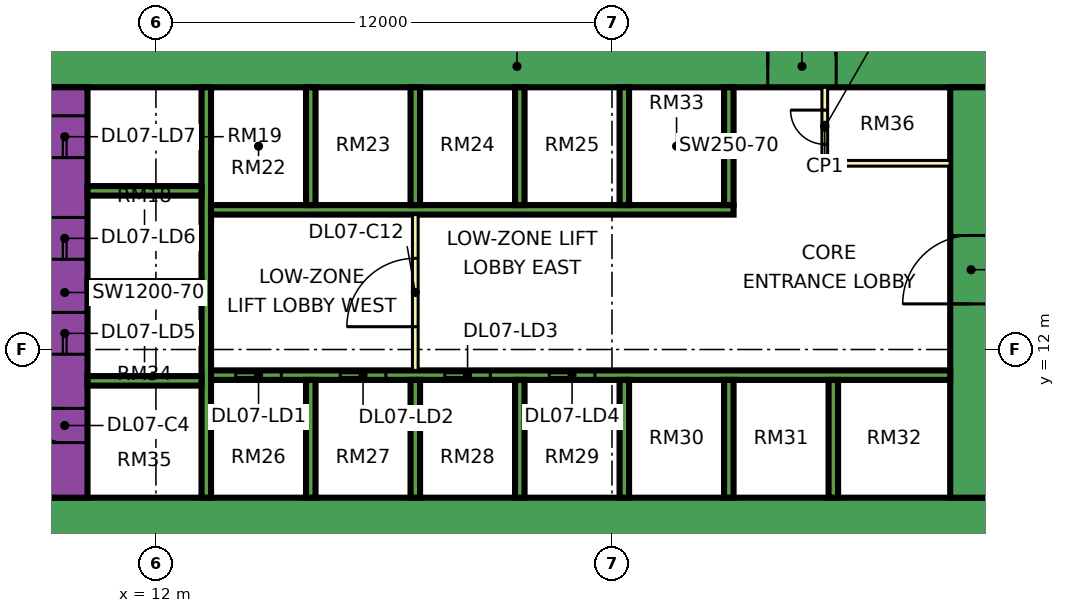
"""IFC4 building model, lengths in metres.
Left out: names, types, materials, properties, quantities, classifications, styles, units other than length and angle.
Written with IfcOpenShell. Run it as: python <this file> out.ifc"""

import sys

from ifc_helpers import new_model, si_unit, direction, frame, frame_2d, origin, place, context, subcontext, project, spatial, rectangle, extrude, element, fill, save


model = new_model("IFC4")
c1 = context("Model", 3, precision=1e-05, world=origin(), true_north=direction((0.0, 1.0)))
c2 = subcontext(c1, "Body", "Model", "MODEL_VIEW")
j1 = project(units=[si_unit("LENGTHUNIT", "METRE"), si_unit("PLANEANGLEUNIT", "RADIAN")], contexts=[c1])
p1 = place(None, origin())
s1 = spatial("IfcSite", under=j1, at=p1, CompositionType="ELEMENT")
p2 = place(p1, origin())
s2 = spatial("IfcBuilding", under=s1, at=p2, CompositionType="ELEMENT")
p3 = place(p2, frame((0.0, 0.0, 41.4)))
s3 = spatial("IfcBuildingStorey", under=s2, at=p3, CompositionType="ELEMENT", Elevation=41.4)
p4 = place(p3, frame((9.0, 7.55, 0.0), z_axis=(0.0, 0.0, 1.0), x_axis=(1.0, 0.0, 0.0)))
e1 = element("IfcWall", 1, at=p4, inside=s3, PredefinedType="SHEAR", context=c2, shape_type="SweptSolid", body=[
    extrude(rectangle(XDim=25.0, YDim=1.1, at=frame_2d((12.5, 0.0))), origin(), (0.0, 0.0, 1.0), 3.75),
])
p5 = place(p3, frame((9.0, 19.45, 0.0), z_axis=(0.0, 0.0, 1.0), x_axis=(1.0, 0.0, 0.0)))
e2 = element("IfcWall", 2, at=p5, inside=s3, PredefinedType="SHEAR", context=c2, shape_type="SweptSolid", body=[
    extrude(rectangle(XDim=25.0, YDim=1.1, at=frame_2d((12.5, 0.0))), origin(), (0.0, 0.0, 1.0), 3.75),
])
p6 = place(p5, frame((19.1, 0.0, 0.0)))
e3 = element("IfcOpeningElement", 3, at=p6, cuts=e2, PredefinedType="OPENING", context=c2, shape_type="SweptSolid", body=[
    extrude(rectangle(XDim=1.8, YDim=2.4, at=frame_2d((0.9, 1.2))), frame((0.0, 0.56, 0.0), z_axis=(0.0, -1.0, 0.0), x_axis=(1.0, 0.0, 0.0)), (0.0, 0.0, 1.0), 1.12),
])
p7 = place(p3, frame((9.6, 8.1, 0.0), z_axis=(0.0, 0.0, 1.0), x_axis=(0.0, 1.0, 0.0)))
e4 = element("IfcWall", 4, at=p7, inside=s3, PredefinedType="SHEAR", context=c2, shape_type="SweptSolid", body=[
    extrude(rectangle(XDim=10.8, YDim=1.2, at=frame_2d((5.4, 0.0))), origin(), (0.0, 0.0, 1.0), 3.75),
])
p8 = place(p7, frame((3.775, 0.0, 0.0)))
e5 = element("IfcOpeningElement", 5, at=p8, cuts=e4, PredefinedType="OPENING", context=c2, shape_type="SweptSolid", body=[
    extrude(rectangle(XDim=1.1, YDim=2.2, at=frame_2d((0.55, 1.1))), frame((0.0, 0.61, 0.0), z_axis=(0.0, -1.0, 0.0), x_axis=(1.0, 0.0, 0.0)), (0.0, 0.0, 1.0), 1.22),
])
p9 = place(p7, frame((6.275, 0.0, 0.0)))
e6 = element("IfcOpeningElement", 6, at=p9, cuts=e4, PredefinedType="OPENING", context=c2, shape_type="SweptSolid", body=[
    extrude(rectangle(XDim=1.1, YDim=2.2, at=frame_2d((0.55, 1.1))), frame((0.0, 0.61, 0.0), z_axis=(0.0, -1.0, 0.0), x_axis=(1.0, 0.0, 0.0)), (0.0, 0.0, 1.0), 1.22),
])
p10 = place(p7, frame((8.95, 0.0, 0.0)))
e7 = element("IfcOpeningElement", 7, at=p10, cuts=e4, PredefinedType="OPENING", context=c2, shape_type="SweptSolid", body=[
    extrude(rectangle(XDim=1.1, YDim=2.2, at=frame_2d((0.55, 1.1))), frame((0.0, 0.61, 0.0), z_axis=(0.0, -1.0, 0.0), x_axis=(1.0, 0.0, 0.0)), (0.0, 0.0, 1.0), 1.22),
])
p11 = place(p7, frame((1.45, 0.0, 0.0)))
e8 = element("IfcOpeningElement", 8, at=p11, cuts=e4, PredefinedType="OPENING", context=c2, shape_type="SweptSolid", body=[
    extrude(rectangle(XDim=0.9, YDim=2.1, at=frame_2d((0.45, 1.05))), frame((0.0, 0.61, 0.0), z_axis=(0.0, -1.0, 0.0), x_axis=(1.0, 0.0, 0.0)), (0.0, 0.0, 1.0), 1.22),
])
p12 = place(p3, frame((33.45, 8.1, 0.0), z_axis=(0.0, 0.0, 1.0), x_axis=(0.0, 1.0, 0.0)))
e9 = element("IfcWall", 9, at=p12, inside=s3, PredefinedType="SHEAR", context=c2, shape_type="SweptSolid", body=[
    extrude(rectangle(XDim=10.8, YDim=1.1, at=frame_2d((5.4, 0.0))), origin(), (0.0, 0.0, 1.0), 3.75),
])
p13 = place(p12, frame((5.1, 0.0, 0.0)))
e10 = element("IfcOpeningElement", 10, at=p13, cuts=e9, PredefinedType="OPENING", context=c2, shape_type="SweptSolid", body=[
    extrude(rectangle(XDim=1.8, YDim=2.4, at=frame_2d((0.9, 1.2))), frame((0.0, 0.56, 0.0), z_axis=(0.0, -1.0, 0.0), x_axis=(1.0, 0.0, 0.0)), (0.0, 0.0, 1.0), 1.12),
])
p14 = place(p3, frame((13.325, 8.1, 0.0), z_axis=(0.0, 0.0, 1.0), x_axis=(0.0, 1.0, 0.0)))
e11 = element("IfcWall", 11, at=p14, inside=s3, PredefinedType="SHEAR", context=c2, shape_type="SweptSolid", body=[
    extrude(rectangle(XDim=10.8, YDim=0.25, at=frame_2d((5.4, 0.0))), origin(), (0.0, 0.0, 1.0), 3.75),
])
p15 = place(p3, frame((13.45, 11.325, 0.0), z_axis=(0.0, 0.0, 1.0), x_axis=(1.0, 0.0, 0.0)))
e12 = element("IfcWall", 12, at=p15, inside=s3, PredefinedType="SHEAR", context=c2, shape_type="SweptSolid", body=[
    extrude(rectangle(XDim=19.45, YDim=0.25, at=frame_2d((9.725, 0.0))), origin(), (0.0, 0.0, 1.0), 3.75),
])
p16 = place(p15, frame((0.65, 0.0, 0.0)))
e13 = element("IfcOpeningElement", 13, at=p16, cuts=e12, PredefinedType="OPENING", context=c2, shape_type="SweptSolid", body=[
    extrude(rectangle(XDim=1.2, YDim=2.2, at=frame_2d((0.6, 1.1))), frame((0.0, 0.135, 0.0), z_axis=(0.0, -1.0, 0.0), x_axis=(1.0, 0.0, 0.0)), (0.0, 0.0, 1.0), 0.27),
])
p17 = place(p15, frame((3.4, 0.0, 0.0)))
e14 = element("IfcOpeningElement", 14, at=p17, cuts=e12, PredefinedType="OPENING", context=c2, shape_type="SweptSolid", body=[
    extrude(rectangle(XDim=1.2, YDim=2.2, at=frame_2d((0.6, 1.1))), frame((0.0, 0.135, 0.0), z_axis=(0.0, -1.0, 0.0), x_axis=(1.0, 0.0, 0.0)), (0.0, 0.0, 1.0), 0.27),
])
p18 = place(p15, frame((6.15, 0.0, 0.0)))
e15 = element("IfcOpeningElement", 15, at=p18, cuts=e12, PredefinedType="OPENING", context=c2, shape_type="SweptSolid", body=[
    extrude(rectangle(XDim=1.2, YDim=2.2, at=frame_2d((0.6, 1.1))), frame((0.0, 0.135, 0.0), z_axis=(0.0, -1.0, 0.0), x_axis=(1.0, 0.0, 0.0)), (0.0, 0.0, 1.0), 0.27),
])
p19 = place(p15, frame((8.9, 0.0, 0.0)))
e16 = element("IfcOpeningElement", 16, at=p19, cuts=e12, PredefinedType="OPENING", context=c2, shape_type="SweptSolid", body=[
    extrude(rectangle(XDim=1.2, YDim=2.2, at=frame_2d((0.6, 1.1))), frame((0.0, 0.135, 0.0), z_axis=(0.0, -1.0, 0.0), x_axis=(1.0, 0.0, 0.0)), (0.0, 0.0, 1.0), 0.27),
])
p20 = place(p3, frame((13.45, 15.675, 0.0), z_axis=(0.0, 0.0, 1.0), x_axis=(1.0, 0.0, 0.0)))
e17 = element("IfcWall", 17, at=p20, inside=s3, PredefinedType="SHEAR", context=c2, shape_type="SweptSolid", body=[
    extrude(rectangle(XDim=13.75, YDim=0.25, at=frame_2d((6.875, 0.0))), origin(), (0.0, 0.0, 1.0), 3.75),
])
for number, where, z_axis, x_axis in (
    (18, (10.2, 11.175, 0.0), (0.0, 0.0, 1.0), (1.0, 0.0, 0.0)),
    (19, (10.2, 13.675, 0.0), (0.0, 0.0, 1.0), (1.0, 0.0, 0.0)),
    (20, (10.2, 16.175, 0.0), (0.0, 0.0, 1.0), (1.0, 0.0, 0.0)),
):
    element("IfcWall", number, at=place(p3, frame(where, z_axis=z_axis, x_axis=x_axis)), inside=s3, PredefinedType="SHEAR", context=c2, shape_type="SweptSolid", body=[
        extrude(rectangle(XDim=3.0, YDim=0.25, at=frame_2d((1.5, 0.0))), origin(), (0.0, 0.0, 1.0), 3.75),
    ])
for number, where, z_axis, x_axis in (
    (21, (16.075, 8.1, 0.0), (0.0, 0.0, 1.0), (0.0, 1.0, 0.0)),
    (22, (18.825, 8.1, 0.0), (0.0, 0.0, 1.0), (0.0, 1.0, 0.0)),
    (23, (21.575, 8.1, 0.0), (0.0, 0.0, 1.0), (0.0, 1.0, 0.0)),
    (24, (24.325, 8.1, 0.0), (0.0, 0.0, 1.0), (0.0, 1.0, 0.0)),
    (25, (27.075, 8.1, 0.0), (0.0, 0.0, 1.0), (0.0, 1.0, 0.0)),
    (26, (29.825, 8.1, 0.0), (0.0, 0.0, 1.0), (0.0, 1.0, 0.0)),
    (27, (16.075, 15.8, 0.0), (0.0, 0.0, 1.0), (0.0, 1.0, 0.0)),
    (28, (18.825, 15.8, 0.0), (0.0, 0.0, 1.0), (0.0, 1.0, 0.0)),
    (29, (21.575, 15.8, 0.0), (0.0, 0.0, 1.0), (0.0, 1.0, 0.0)),
    (30, (24.325, 15.8, 0.0), (0.0, 0.0, 1.0), (0.0, 1.0, 0.0)),
    (31, (27.075, 15.8, 0.0), (0.0, 0.0, 1.0), (0.0, 1.0, 0.0)),
):
    element("IfcWall", number, at=place(p3, frame(where, z_axis=z_axis, x_axis=x_axis)), inside=s3, PredefinedType="SHEAR", context=c2, shape_type="SweptSolid", body=[
        extrude(rectangle(XDim=3.1, YDim=0.25, at=frame_2d((1.55, 0.0))), origin(), (0.0, 0.0, 1.0), 3.75),
    ])
p21 = place(p3, frame((-1.447, 12.553, 0.0), z_axis=(0.0, 0.0, 1.0), x_axis=(0.707106781187, -0.707106781187, 0.0)))
e32 = element("IfcWall", 32, at=p21, inside=s3, PredefinedType="SOLIDWALL", context=c2, shape_type="SweptSolid", body=[
    extrude(rectangle(XDim=19.799, YDim=0.15, at=frame_2d((9.899, 0.0))), origin(), (0.0, 0.0, 1.0), 3.35),
])
p22 = place(p21, frame((2.212, 0.0, 0.45)))
e33 = element("IfcOpeningElement", 33, at=p22, cuts=e32, PredefinedType="OPENING", context=c2, shape_type="SweptSolid", body=[
    extrude(rectangle(XDim=3.0, YDim=2.4, at=frame_2d((1.5, 1.2))), frame((0.0, 0.085, 0.0), z_axis=(0.0, -1.0, 0.0), x_axis=(1.0, 0.0, 0.0)), (0.0, 0.0, 1.0), 0.17),
])
p23 = place(p21, frame((10.216, 0.0, 0.45)))
e34 = element("IfcOpeningElement", 34, at=p23, cuts=e32, PredefinedType="OPENING", context=c2, shape_type="SweptSolid", body=[
    extrude(rectangle(XDim=3.0, YDim=2.4, at=frame_2d((1.5, 1.2))), frame((0.0, 0.085, 0.0), z_axis=(0.0, -1.0, 0.0), x_axis=(1.0, 0.0, 0.0)), (0.0, 0.0, 1.0), 0.17),
])
p24 = place(p3, frame((18.825, 11.45, 0.0), z_axis=(0.0, 0.0, 1.0), x_axis=(0.0, 1.0, 0.0)))
e35 = element("IfcWall", 35, at=p24, inside=s3, PredefinedType="PARTITIONING", context=c2, shape_type="SweptSolid", body=[
    extrude(rectangle(XDim=4.1, YDim=0.15, at=frame_2d((2.05, 0.0))), origin(), (0.0, 0.0, 1.0), 3.35),
])
p25 = place(p24, frame((1.15, 0.0, 0.0)))
e36 = element("IfcOpeningElement", 36, at=p25, cuts=e35, PredefinedType="OPENING", context=c2, shape_type="SweptSolid", body=[
    extrude(rectangle(XDim=1.8, YDim=2.4, at=frame_2d((0.9, 1.2))), frame((0.0, 0.085, 0.0), z_axis=(0.0, -1.0, 0.0), x_axis=(1.0, 0.0, 0.0)), (0.0, 0.0, 1.0), 0.17),
])
p26 = place(p3, frame((29.6, 16.9, 0.0), z_axis=(0.0, 0.0, 1.0), x_axis=(0.0, 1.0, 0.0)))
e37 = element("IfcWall", 37, at=p26, inside=s3, PredefinedType="PARTITIONING", context=c2, shape_type="SweptSolid", body=[
    extrude(rectangle(XDim=2.0, YDim=0.15, at=frame_2d((1.0, 0.0))), origin(), (0.0, 0.0, 1.0), 3.35),
])
p27 = place(p26, frame((0.5, 0.0, 0.0)))
e38 = element("IfcOpeningElement", 38, at=p27, cuts=e37, PredefinedType="OPENING", context=c2, shape_type="SweptSolid", body=[
    extrude(rectangle(XDim=0.9, YDim=2.1, at=frame_2d((0.45, 1.05))), frame((0.0, 0.085, 0.0), z_axis=(0.0, -1.0, 0.0), x_axis=(1.0, 0.0, 0.0)), (0.0, 0.0, 1.0), 0.17),
])
p28 = place(p3, frame((29.6, 16.9, 0.0), z_axis=(0.0, 0.0, 1.0), x_axis=(1.0, 0.0, 0.0)))
e39 = element("IfcWall", 39, at=p28, inside=s3, PredefinedType="PARTITIONING", context=c2, shape_type="SweptSolid", body=[
    extrude(rectangle(XDim=3.3, YDim=0.15, at=frame_2d((1.65, 0.0))), origin(), (0.0, 0.0, 1.0), 3.35),
])
p29 = place(p16, origin())
e40 = element("IfcDoor", 40, at=p29, inside=s3, OperationType="DOUBLE_DOOR_SLIDING", PredefinedType="DOOR", context=c2, shape_type="SweptSolid", body=[
    extrude(rectangle(XDim=1.2, YDim=2.2, at=frame_2d((0.6, 1.1))), frame((0.0, 0.025, 0.0), z_axis=(0.0, -1.0, 0.0), x_axis=(1.0, 0.0, 0.0)), (0.0, 0.0, 1.0), 0.05),
])
fill(e13, e40)
p30 = place(p17, origin())
e41 = element("IfcDoor", 41, at=p30, inside=s3, OperationType="DOUBLE_DOOR_SLIDING", PredefinedType="DOOR", context=c2, shape_type="SweptSolid", body=[
    extrude(rectangle(XDim=1.2, YDim=2.2, at=frame_2d((0.6, 1.1))), frame((0.0, 0.025, 0.0), z_axis=(0.0, -1.0, 0.0), x_axis=(1.0, 0.0, 0.0)), (0.0, 0.0, 1.0), 0.05),
])
fill(e14, e41)
p31 = place(p18, origin())
e42 = element("IfcDoor", 42, at=p31, inside=s3, OperationType="DOUBLE_DOOR_SLIDING", PredefinedType="DOOR", context=c2, shape_type="SweptSolid", body=[
    extrude(rectangle(XDim=1.2, YDim=2.2, at=frame_2d((0.6, 1.1))), frame((0.0, 0.025, 0.0), z_axis=(0.0, -1.0, 0.0), x_axis=(1.0, 0.0, 0.0)), (0.0, 0.0, 1.0), 0.05),
])
fill(e15, e42)
p32 = place(p19, origin())
e43 = element("IfcDoor", 43, at=p32, inside=s3, OperationType="DOUBLE_DOOR_SLIDING", PredefinedType="DOOR", context=c2, shape_type="SweptSolid", body=[
    extrude(rectangle(XDim=1.2, YDim=2.2, at=frame_2d((0.6, 1.1))), frame((0.0, 0.025, 0.0), z_axis=(0.0, -1.0, 0.0), x_axis=(1.0, 0.0, 0.0)), (0.0, 0.0, 1.0), 0.05),
])
fill(e16, e43)
p33 = place(p8, origin())
e44 = element("IfcDoor", 44, at=p33, inside=s3, OperationType="DOUBLE_DOOR_SLIDING", PredefinedType="DOOR", context=c2, shape_type="SweptSolid", body=[
    extrude(rectangle(XDim=1.1, YDim=2.2, at=frame_2d((0.55, 1.1))), frame((0.0, 0.025, 0.0), z_axis=(0.0, -1.0, 0.0), x_axis=(1.0, 0.0, 0.0)), (0.0, 0.0, 1.0), 0.05),
])
fill(e5, e44)
p34 = place(p9, origin())
e45 = element("IfcDoor", 45, at=p34, inside=s3, OperationType="DOUBLE_DOOR_SLIDING", PredefinedType="DOOR", context=c2, shape_type="SweptSolid", body=[
    extrude(rectangle(XDim=1.1, YDim=2.2, at=frame_2d((0.55, 1.1))), frame((0.0, 0.025, 0.0), z_axis=(0.0, -1.0, 0.0), x_axis=(1.0, 0.0, 0.0)), (0.0, 0.0, 1.0), 0.05),
])
fill(e6, e45)
p35 = place(p10, origin())
e46 = element("IfcDoor", 46, at=p35, inside=s3, OperationType="DOUBLE_DOOR_SLIDING", PredefinedType="DOOR", context=c2, shape_type="SweptSolid", body=[
    extrude(rectangle(XDim=1.1, YDim=2.2, at=frame_2d((0.55, 1.1))), frame((0.0, 0.025, 0.0), z_axis=(0.0, -1.0, 0.0), x_axis=(1.0, 0.0, 0.0)), (0.0, 0.0, 1.0), 0.05),
])
fill(e7, e46)
p36 = place(p13, origin())
e47 = element("IfcDoor", 47, at=p36, inside=s3, OperationType="DOUBLE_DOOR_SINGLE_SWING", PredefinedType="DOOR", context=c2, shape_type="SweptSolid", body=[
    extrude(rectangle(XDim=1.8, YDim=2.4, at=frame_2d((0.9, 1.2))), frame((0.0, 0.025, 0.0), z_axis=(0.0, -1.0, 0.0), x_axis=(1.0, 0.0, 0.0)), (0.0, 0.0, 1.0), 0.05),
])
fill(e10, e47)
p37 = place(p6, origin())
e48 = element("IfcDoor", 48, at=p37, inside=s3, OperationType="DOUBLE_DOOR_SINGLE_SWING", PredefinedType="DOOR", context=c2, shape_type="SweptSolid", body=[
    extrude(rectangle(XDim=1.8, YDim=2.4, at=frame_2d((0.9, 1.2))), frame((0.0, 0.025, 0.0), z_axis=(0.0, -1.0, 0.0), x_axis=(1.0, 0.0, 0.0)), (0.0, 0.0, 1.0), 0.05),
])
fill(e3, e48)
p38 = place(p11, frame((0.9, 0.0, 0.0), z_axis=(0.0, 0.0, 1.0), x_axis=(-1.0, 0.0, 0.0)))
e49 = element("IfcDoor", 49, at=p38, inside=s3, OperationType="SINGLE_SWING_RIGHT", PredefinedType="DOOR", context=c2, shape_type="SweptSolid", body=[
    extrude(rectangle(XDim=0.9, YDim=2.1, at=frame_2d((0.45, 1.05))), frame((0.0, 0.025, 0.0), z_axis=(0.0, -1.0, 0.0), x_axis=(1.0, 0.0, 0.0)), (0.0, 0.0, 1.0), 0.05),
])
fill(e8, e49)
p39 = place(p25, origin())
e50 = element("IfcDoor", 50, at=p39, inside=s3, OperationType="DOUBLE_DOOR_SINGLE_SWING", PredefinedType="DOOR", context=c2, shape_type="SweptSolid", body=[
    extrude(rectangle(XDim=1.8, YDim=2.4, at=frame_2d((0.9, 1.2))), frame((0.0, 0.025, 0.0), z_axis=(0.0, -1.0, 0.0), x_axis=(1.0, 0.0, 0.0)), (0.0, 0.0, 1.0), 0.05),
])
fill(e36, e50)
p40 = place(p27, frame((0.9, 0.0, 0.0), z_axis=(0.0, 0.0, 1.0), x_axis=(-1.0, 0.0, 0.0)))
e51 = element("IfcDoor", 51, at=p40, inside=s3, OperationType="SINGLE_SWING_RIGHT", PredefinedType="DOOR", context=c2, shape_type="SweptSolid", body=[
    extrude(rectangle(XDim=0.9, YDim=2.1, at=frame_2d((0.45, 1.05))), frame((0.0, 0.025, 0.0), z_axis=(0.0, -1.0, 0.0), x_axis=(1.0, 0.0, 0.0)), (0.0, 0.0, 1.0), 0.05),
])
fill(e38, e51)
save(model, sys.argv[1])
